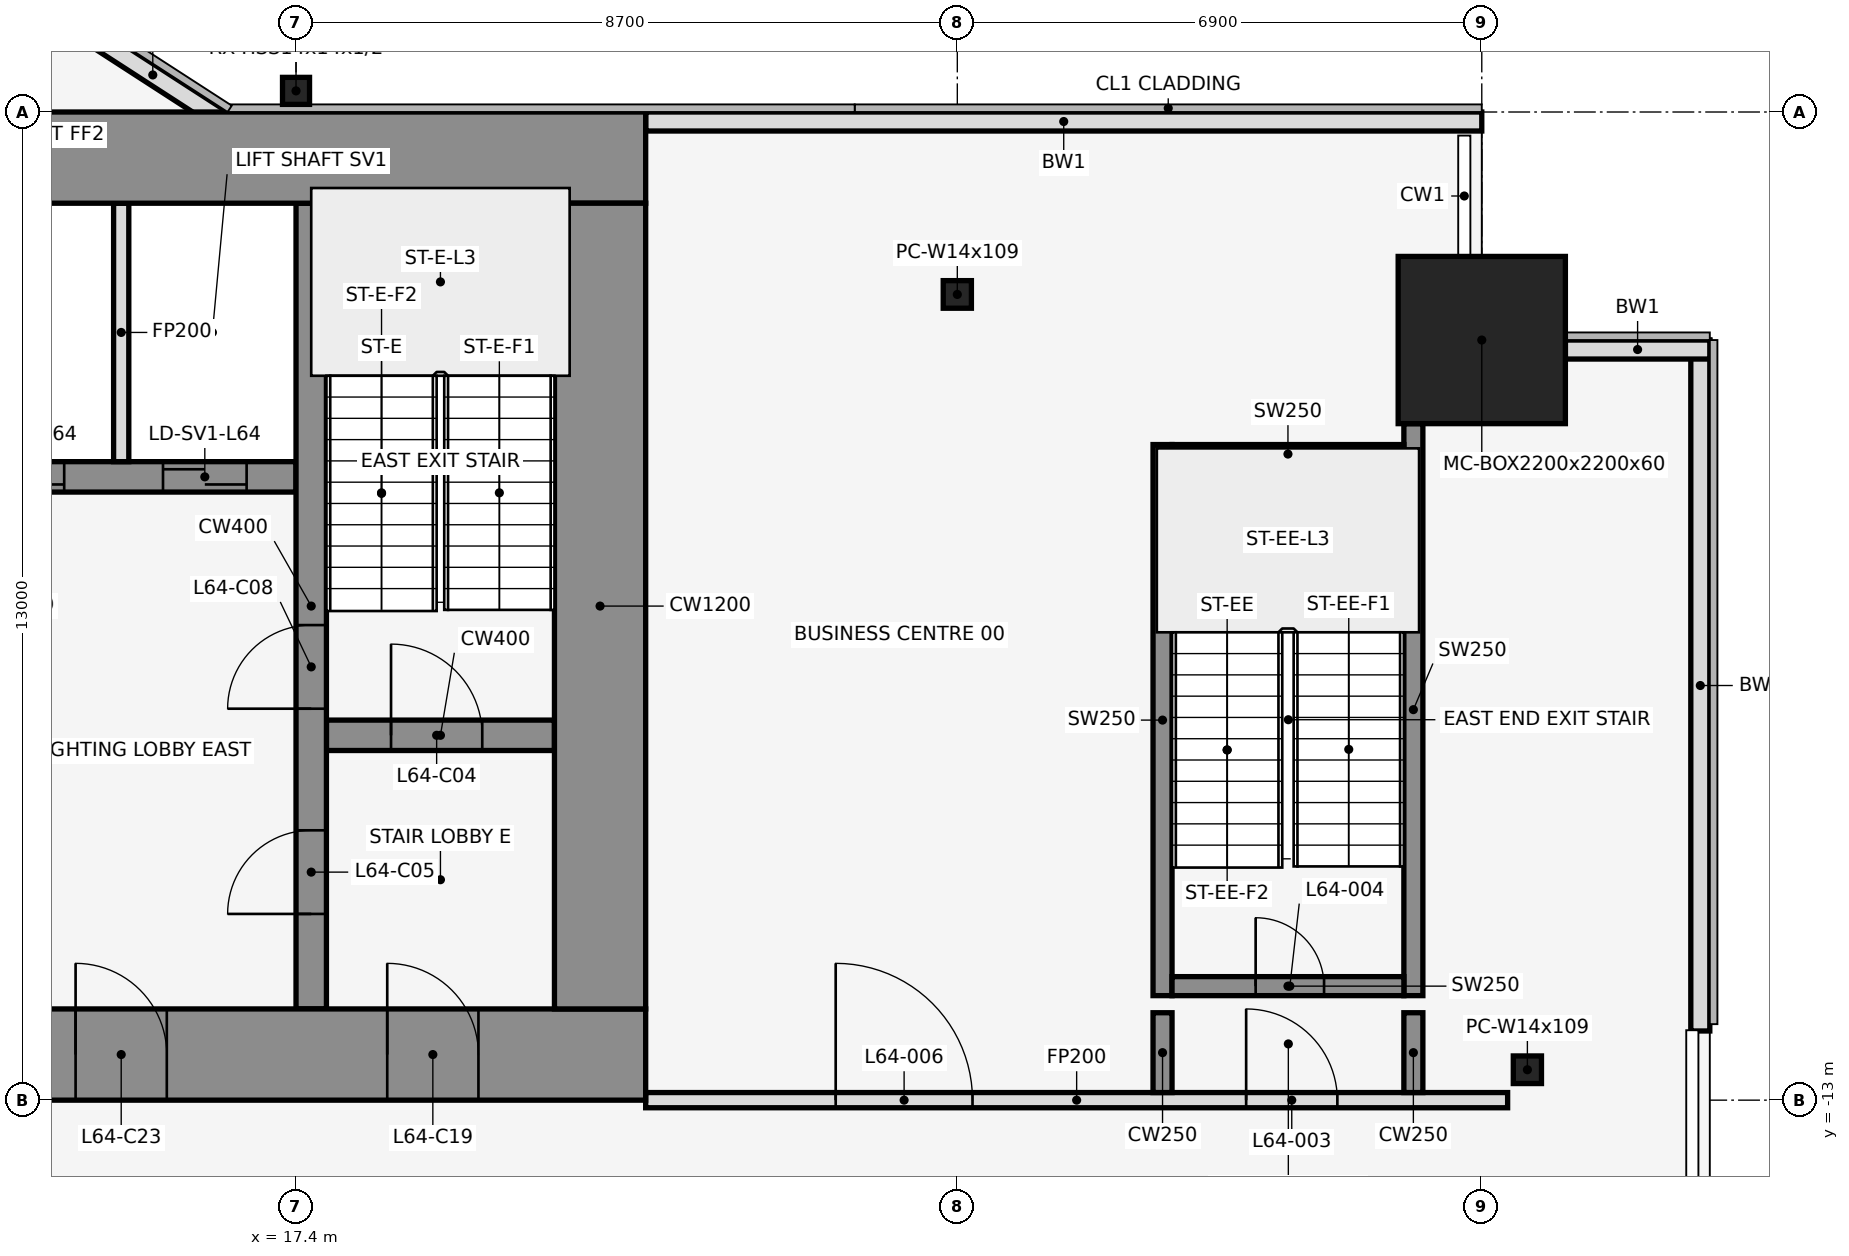
"""IFC4 building model, lengths in metres.
Left out: names, types, materials, properties, quantities, classifications, styles, units other than length and angle.
Written with IfcOpenShell. Run it as: python <this file> out.ifc"""

import sys

from ifc_helpers import new_model, si_unit, direction, frame, frame_2d, origin, origin_2d, place, context, subcontext, project, spatial, rectangle, hollow_rectangle, i_section, extrude, element, fill, save


model = new_model("IFC4")
c1 = context("Model", 3, precision=1e-05, world=origin(), true_north=direction((0.0, 1.0)))
c2 = subcontext(c1, "Body", "Model", "MODEL_VIEW")
j1 = project(units=[si_unit("LENGTHUNIT", "METRE"), si_unit("PLANEANGLEUNIT", "RADIAN")], contexts=[c1])
p1 = place(None, origin())
s1 = spatial("IfcSite", under=j1, at=p1, CompositionType="ELEMENT")
p2 = place(p1, origin())
s2 = spatial("IfcBuilding", under=s1, at=p2, CompositionType="ELEMENT")
p3 = place(p2, frame((0.0, 0.0, 283.4)))
s3 = spatial("IfcBuildingStorey", under=s2, at=p3, CompositionType="ELEMENT", Elevation=283.4)
p4 = place(p3, frame((26.1, -2.4, 0.0), z_axis=(0.0, 0.0, 1.0), x_axis=(1.0, 0.0, 0.0)))
e1 = element("IfcColumn", 1, at=p4, inside=s3, PredefinedType="COLUMN", context=c2, shape_type="SweptSolid", body=[
    extrude(i_section(OverallWidth=0.371, OverallDepth=0.363, WebThickness=0.013, FlangeThickness=0.022, at=origin_2d()), origin(), (0.0, 0.0, 1.0), 4.2),
])
p5 = place(p3, frame((33.0, -3.0, 0.0), z_axis=(0.0, 0.0, 1.0), x_axis=(1.0, 0.0, 0.0)))
e2 = element("IfcColumn", 2, at=p5, inside=s3, PredefinedType="COLUMN", context=c2, shape_type="SweptSolid", body=[
    extrude(hollow_rectangle(XDim=2.2, YDim=2.2, WallThickness=0.06, at=origin_2d()), origin(), (0.0, 0.0, 1.0), 4.2),
])
p6 = place(p3, frame((17.4, 0.278, 0.0), z_axis=(0.0, 0.0, 1.0), x_axis=(1.0, 0.0, 0.0)))
e3 = element("IfcColumn", 3, at=p6, inside=s3, PredefinedType="COLUMN", context=c2, shape_type="SweptSolid", body=[
    extrude(hollow_rectangle(XDim=0.356, YDim=0.356, WallThickness=0.012, at=origin_2d()), origin(), (0.0, 0.0, 1.0), 4.2),
])
p7 = place(p3, frame((33.6, -12.6, 0.0), z_axis=(0.0, 0.0, 1.0), x_axis=(1.0, 0.0, 0.0)))
e4 = element("IfcColumn", 4, at=p7, inside=s3, PredefinedType="COLUMN", context=c2, shape_type="SweptSolid", body=[
    extrude(i_section(OverallWidth=0.371, OverallDepth=0.363, WebThickness=0.013, FlangeThickness=0.022, at=origin_2d()), origin(), (0.0, 0.0, 1.0), 4.2),
])
p8 = place(p3, frame((33.0, -0.125, 0.0), z_axis=(0.0, 0.0, 1.0), x_axis=(-1.0, 0.0, 0.0)))
e5 = element("IfcWall", 5, at=p8, inside=s3, PredefinedType="STANDARD", context=c2, shape_type="SweptSolid", body=[
    extrude(rectangle(XDim=11.0, YDim=0.25, at=frame_2d((5.5, 0.0))), origin(), (0.0, 0.0, 1.0), 4.0),
])
p9 = place(p3, frame((16.432, -0.105, 0.0), z_axis=(0.0, 0.0, 1.0), x_axis=(-0.83981312244, 0.542875602121, 0.0)))
e6 = element("IfcWall", 6, at=p9, inside=s3, PredefinedType="STANDARD", context=c2, shape_type="SweptSolid", body=[
    extrude(rectangle(XDim=2.183, YDim=0.25, at=frame_2d((1.091, 0.0))), origin(), (0.0, 0.0, 1.0), 4.0),
])
p10 = place(p3, frame((35.875, -12.09, 0.0), z_axis=(0.0, 0.0, 1.0), x_axis=(0.0, 1.0, 0.0)))
e7 = element("IfcWall", 7, at=p10, inside=s3, PredefinedType="STANDARD", context=c2, shape_type="SweptSolid", body=[
    extrude(rectangle(XDim=9.09, YDim=0.25, at=frame_2d((4.545, 0.0))), origin(), (0.0, 0.0, 1.0), 4.0),
])
p11 = place(p3, frame((36.0, -3.125, 0.0), z_axis=(0.0, 0.0, 1.0), x_axis=(-1.0, 0.0, 0.0)))
e8 = element("IfcWall", 8, at=p11, inside=s3, PredefinedType="STANDARD", context=c2, shape_type="SweptSolid", body=[
    extrude(rectangle(XDim=1.9, YDim=0.25, at=frame_2d((0.95, 0.0))), origin(), (0.0, 0.0, 1.0), 4.0),
])
p12 = place(p3, frame((28.8, -11.625, 0.0), z_axis=(0.0, 0.0, 1.0), x_axis=(0.0, 1.0, 0.0)))
e9 = element("IfcWall", 9, at=p12, inside=s3, PredefinedType="SHEAR", context=c2, shape_type="SweptSolid", body=[
    extrude(rectangle(XDim=7.25, YDim=0.25, at=frame_2d((3.625, 0.0))), origin(), (0.0, 0.0, 1.0), 4.2),
])
p13 = place(p3, frame((32.1, -11.625, 0.0), z_axis=(0.0, 0.0, 1.0), x_axis=(0.0, 1.0, 0.0)))
e10 = element("IfcWall", 10, at=p13, inside=s3, PredefinedType="SHEAR", context=c2, shape_type="SweptSolid", body=[
    extrude(rectangle(XDim=7.525, YDim=0.25, at=frame_2d((3.762, 0.0))), origin(), (0.0, 0.0, 1.0), 4.2),
])
p14 = place(p3, frame((28.925, -11.5, 0.0), z_axis=(0.0, 0.0, 1.0), x_axis=(1.0, 0.0, 0.0)))
e11 = element("IfcWall", 11, at=p14, inside=s3, PredefinedType="SHEAR", context=c2, shape_type="SweptSolid", body=[
    extrude(rectangle(XDim=3.05, YDim=0.25, at=frame_2d((1.525, 0.0))), origin(), (0.0, 0.0, 1.0), 4.2),
])
p15 = place(p14, frame((1.1, 0.0, 0.0)))
e12 = element("IfcOpeningElement", 12, at=p15, cuts=e11, PredefinedType="OPENING", context=c2, shape_type="SweptSolid", body=[
    extrude(rectangle(XDim=0.9, YDim=2.1, at=frame_2d((0.45, 1.05))), frame((0.0, 0.137, 0.0), z_axis=(0.0, -1.0, 0.0), x_axis=(1.0, 0.0, 0.0)), (0.0, 0.0, 1.0), 0.274),
])
p16 = place(p3, frame((28.925, -4.5, 0.0), z_axis=(0.0, 0.0, 1.0), x_axis=(1.0, 0.0, 0.0)))
e13 = element("IfcWall", 13, at=p16, inside=s3, PredefinedType="SHEAR", context=c2, shape_type="SweptSolid", body=[
    extrude(rectangle(XDim=3.05, YDim=0.25, at=frame_2d((1.525, 0.0))), origin(), (0.0, 0.0, 1.0), 4.2),
])
p17 = place(p3, frame((22.0, -13.0, 0.0), z_axis=(0.0, 0.0, 1.0), x_axis=(1.0, 0.0, 0.0)))
e14 = element("IfcWall", 14, at=p17, inside=s3, PredefinedType="PARTITIONING", context=c2, shape_type="SweptSolid", body=[
    extrude(rectangle(XDim=11.34, YDim=0.2, at=frame_2d((5.67, 0.0))), origin(), (0.0, 0.0, 1.0), 3.068),
])
p18 = place(p17, frame((7.9, 0.0, 0.0)))
e15 = element("IfcOpeningElement", 15, at=p18, cuts=e14, PredefinedType="OPENING", context=c2, shape_type="SweptSolid", body=[
    extrude(rectangle(XDim=1.2, YDim=2.1, at=frame_2d((0.6, 1.05))), frame((0.0, 0.112, 0.0), z_axis=(0.0, -1.0, 0.0), x_axis=(1.0, 0.0, 0.0)), (0.0, 0.0, 1.0), 0.224),
])
p19 = place(p17, frame((2.5, 0.0, 0.0)))
e16 = element("IfcOpeningElement", 16, at=p19, cuts=e14, PredefinedType="OPENING", context=c2, shape_type="SweptSolid", body=[
    extrude(rectangle(XDim=1.8, YDim=2.1, at=frame_2d((0.9, 1.05))), frame((0.0, 0.112, 0.0), z_axis=(0.0, -1.0, 0.0), x_axis=(1.0, 0.0, 0.0)), (0.0, 0.0, 1.0), 0.224),
])
for number, where, z_axis, x_axis in (
    (17, (28.8, -12.9, 0.0), (0.0, 0.0, 1.0), (0.0, 1.0, 0.0)),
    (18, (32.1, -12.9, 0.0), (0.0, 0.0, 1.0), (0.0, 1.0, 0.0)),
):
    element("IfcWall", number, at=place(p3, frame(where, z_axis=z_axis, x_axis=x_axis)), inside=s3, PredefinedType="SHEAR", context=c2, shape_type="SweptSolid", body=[
        extrude(rectangle(XDim=1.05, YDim=0.25, at=frame_2d((0.525, 0.0))), origin(), (0.0, 0.0, 1.0), 4.2),
    ])
p20 = place(p3, frame((17.8, -8.2, 0.0), z_axis=(0.0, 0.0, 1.0), x_axis=(1.0, 0.0, 0.0)))
e19 = element("IfcWall", 19, at=p20, inside=s3, PredefinedType="SHEAR", context=c2, shape_type="SweptSolid", body=[
    extrude(rectangle(XDim=3.0, YDim=0.4, at=frame_2d((1.5, 0.0))), origin(), (0.0, 0.0, 1.0), 4.2),
])
p21 = place(p20, frame((0.85, 0.0, 0.0)))
e20 = element("IfcOpeningElement", 20, at=p21, cuts=e19, PredefinedType="OPENING", context=c2, shape_type="SweptSolid", body=[
    extrude(rectangle(XDim=1.2, YDim=2.1, at=frame_2d((0.6, 1.05))), frame((0.0, 0.212, 0.0), z_axis=(0.0, -1.0, 0.0), x_axis=(1.0, 0.0, 0.0)), (0.0, 0.0, 1.0), 0.424),
])
p22 = place(p3, frame((3.8, -4.8, 0.0), z_axis=(0.0, 0.0, 1.0), x_axis=(1.0, 0.0, 0.0)))
e21 = element("IfcWall", 21, at=p22, inside=s3, PredefinedType="SHEAR", context=c2, shape_type="SweptSolid", body=[
    extrude(rectangle(XDim=13.6, YDim=0.4, at=frame_2d((6.8, 0.0))), origin(), (0.0, 0.0, 1.0), 4.2),
])
p23 = place(p22, frame((0.75, 0.0, 0.0)))
e22 = element("IfcOpeningElement", 22, at=p23, cuts=e21, PredefinedType="OPENING", context=c2, shape_type="SweptSolid", body=[
    extrude(rectangle(XDim=1.2, YDim=2.1, at=frame_2d((0.6, 1.05))), frame((0.0, 0.212, 0.0), z_axis=(0.0, -1.0, 0.0), x_axis=(1.0, 0.0, 0.0)), (0.0, 0.0, 1.0), 0.424),
])
p24 = place(p22, frame((3.65, 0.0, 0.0)))
e23 = element("IfcOpeningElement", 23, at=p24, cuts=e21, PredefinedType="OPENING", context=c2, shape_type="SweptSolid", body=[
    extrude(rectangle(XDim=1.2, YDim=2.1, at=frame_2d((0.6, 1.05))), frame((0.0, 0.212, 0.0), z_axis=(0.0, -1.0, 0.0), x_axis=(1.0, 0.0, 0.0)), (0.0, 0.0, 1.0), 0.424),
])
p25 = place(p22, frame((6.65, 0.0, 0.0)))
e24 = element("IfcOpeningElement", 24, at=p25, cuts=e21, PredefinedType="OPENING", context=c2, shape_type="SweptSolid", body=[
    extrude(rectangle(XDim=1.2, YDim=2.1, at=frame_2d((0.6, 1.05))), frame((0.0, 0.212, 0.0), z_axis=(0.0, -1.0, 0.0), x_axis=(1.0, 0.0, 0.0)), (0.0, 0.0, 1.0), 0.424),
])
p26 = place(p22, frame((9.45, 0.0, 0.0)))
e25 = element("IfcOpeningElement", 25, at=p26, cuts=e21, PredefinedType="OPENING", context=c2, shape_type="SweptSolid", body=[
    extrude(rectangle(XDim=1.1, YDim=2.1, at=frame_2d((0.55, 1.05))), frame((0.0, 0.212, 0.0), z_axis=(0.0, -1.0, 0.0), x_axis=(1.0, 0.0, 0.0)), (0.0, 0.0, 1.0), 0.424),
])
p27 = place(p22, frame((11.85, 0.0, 0.0)))
e26 = element("IfcOpeningElement", 26, at=p27, cuts=e21, PredefinedType="OPENING", context=c2, shape_type="SweptSolid", body=[
    extrude(rectangle(XDim=1.1, YDim=2.1, at=frame_2d((0.55, 1.05))), frame((0.0, 0.212, 0.0), z_axis=(0.0, -1.0, 0.0), x_axis=(1.0, 0.0, 0.0)), (0.0, 0.0, 1.0), 0.424),
])
p28 = place(p3, frame((15.1, -4.6, 0.0), z_axis=(0.0, 0.0, 1.0), x_axis=(0.0, 1.0, 0.0)))
e27 = element("IfcWall", 27, at=p28, inside=s3, PredefinedType="PARTITIONING", context=c2, shape_type="SweptSolid", body=[
    extrude(rectangle(XDim=3.4, YDim=0.2, at=frame_2d((1.7, 0.0))), origin(), (0.0, 0.0, 1.0), 3.068),
])
p29 = place(p3, frame((17.6, -11.8, 0.0), z_axis=(0.0, 0.0, 1.0), x_axis=(0.0, 1.0, 0.0)))
e28 = element("IfcWall", 28, at=p29, inside=s3, PredefinedType="SHEAR", context=c2, shape_type="SweptSolid", body=[
    extrude(rectangle(XDim=10.6, YDim=0.4, at=frame_2d((5.3, 0.0))), origin(), (0.0, 0.0, 1.0), 4.2),
])
p30 = place(p29, frame((1.25, 0.0, 0.0)))
e29 = element("IfcOpeningElement", 29, at=p30, cuts=e28, PredefinedType="OPENING", context=c2, shape_type="SweptSolid", body=[
    extrude(rectangle(XDim=1.1, YDim=2.1, at=frame_2d((0.55, 1.05))), frame((0.0, 0.212, 0.0), z_axis=(0.0, -1.0, 0.0), x_axis=(1.0, 0.0, 0.0)), (0.0, 0.0, 1.0), 0.424),
])
p31 = place(p29, frame((3.95, 0.0, 0.0)))
e30 = element("IfcOpeningElement", 30, at=p31, cuts=e28, PredefinedType="OPENING", context=c2, shape_type="SweptSolid", body=[
    extrude(rectangle(XDim=1.1, YDim=2.1, at=frame_2d((0.55, 1.05))), frame((0.0, 0.212, 0.0), z_axis=(0.0, -1.0, 0.0), x_axis=(1.0, 0.0, 0.0)), (0.0, 0.0, 1.0), 0.424),
])
p32 = place(p3, frame((-22.0, -0.6, 0.0), z_axis=(0.0, 0.0, 1.0), x_axis=(1.0, 0.0, 0.0)))
e31 = element("IfcWall", 31, at=p32, inside=s3, PredefinedType="SHEAR", context=c2, shape_type="SweptSolid", body=[
    extrude(rectangle(XDim=44.0, YDim=1.2, at=frame_2d((22.0, 0.0))), origin(), (0.0, 0.0, 1.0), 4.2),
])
p33 = place(p32, frame((18.55, 0.0, 0.0)))
e32 = element("IfcOpeningElement", 32, at=p33, cuts=e31, PredefinedType="OPENING", context=c2, shape_type="SweptSolid", body=[
    extrude(rectangle(XDim=0.9, YDim=2.1, at=frame_2d((0.45, 1.05))), frame((0.0, 0.612, 0.0), z_axis=(0.0, -1.0, 0.0), x_axis=(1.0, 0.0, 0.0)), (0.0, 0.0, 1.0), 1.224),
])
p34 = place(p32, frame((24.55, 0.0, 0.0)))
e33 = element("IfcOpeningElement", 33, at=p34, cuts=e31, PredefinedType="OPENING", context=c2, shape_type="SweptSolid", body=[
    extrude(rectangle(XDim=0.9, YDim=2.1, at=frame_2d((0.45, 1.05))), frame((0.0, 0.612, 0.0), z_axis=(0.0, -1.0, 0.0), x_axis=(1.0, 0.0, 0.0)), (0.0, 0.0, 1.0), 1.224),
])
p35 = place(p3, frame((-22.0, -12.4, 0.0), z_axis=(0.0, 0.0, 1.0), x_axis=(1.0, 0.0, 0.0)))
e34 = element("IfcWall", 34, at=p35, inside=s3, PredefinedType="SHEAR", context=c2, shape_type="SweptSolid", body=[
    extrude(rectangle(XDim=44.0, YDim=1.2, at=frame_2d((22.0, 0.0))), origin(), (0.0, 0.0, 1.0), 4.2),
])
p36 = place(p35, frame((2.2, 0.0, 0.0)))
e35 = element("IfcOpeningElement", 35, at=p36, cuts=e34, PredefinedType="OPENING", context=c2, shape_type="SweptSolid", body=[
    extrude(rectangle(XDim=1.2, YDim=2.1, at=frame_2d((0.6, 1.05))), frame((0.0, 0.612, 0.0), z_axis=(0.0, -1.0, 0.0), x_axis=(1.0, 0.0, 0.0)), (0.0, 0.0, 1.0), 1.224),
])
p37 = place(p35, frame((21.4, 0.0, 0.0)))
e36 = element("IfcOpeningElement", 36, at=p37, cuts=e34, PredefinedType="OPENING", context=c2, shape_type="SweptSolid", body=[
    extrude(rectangle(XDim=1.2, YDim=2.1, at=frame_2d((0.6, 1.05))), frame((0.0, 0.612, 0.0), z_axis=(0.0, -1.0, 0.0), x_axis=(1.0, 0.0, 0.0)), (0.0, 0.0, 1.0), 1.224),
])
p38 = place(p35, frame((40.6, 0.0, 0.0)))
e37 = element("IfcOpeningElement", 37, at=p38, cuts=e34, PredefinedType="OPENING", context=c2, shape_type="SweptSolid", body=[
    extrude(rectangle(XDim=1.2, YDim=2.1, at=frame_2d((0.6, 1.05))), frame((0.0, 0.612, 0.0), z_axis=(0.0, -1.0, 0.0), x_axis=(1.0, 0.0, 0.0)), (0.0, 0.0, 1.0), 1.224),
])
p39 = place(p35, frame((16.0, 0.0, 0.0)))
e38 = element("IfcOpeningElement", 38, at=p39, cuts=e34, PredefinedType="OPENING", context=c2, shape_type="SweptSolid", body=[
    extrude(rectangle(XDim=1.8, YDim=2.1, at=frame_2d((0.9, 1.05))), frame((0.0, 0.612, 0.0), z_axis=(0.0, -1.0, 0.0), x_axis=(1.0, 0.0, 0.0)), (0.0, 0.0, 1.0), 1.224),
])
p40 = place(p35, frame((6.3, 0.0, 0.0)))
e39 = element("IfcOpeningElement", 39, at=p40, cuts=e34, PredefinedType="OPENING", context=c2, shape_type="SweptSolid", body=[
    extrude(rectangle(XDim=1.2, YDim=2.1, at=frame_2d((0.6, 1.05))), frame((0.0, 0.612, 0.0), z_axis=(0.0, -1.0, 0.0), x_axis=(1.0, 0.0, 0.0)), (0.0, 0.0, 1.0), 1.224),
])
p41 = place(p35, frame((26.2, 0.0, 0.0)))
e40 = element("IfcOpeningElement", 40, at=p41, cuts=e34, PredefinedType="OPENING", context=c2, shape_type="SweptSolid", body=[
    extrude(rectangle(XDim=1.8, YDim=2.1, at=frame_2d((0.9, 1.05))), frame((0.0, 0.612, 0.0), z_axis=(0.0, -1.0, 0.0), x_axis=(1.0, 0.0, 0.0)), (0.0, 0.0, 1.0), 1.224),
])
p42 = place(p35, frame((36.5, 0.0, 0.0)))
e41 = element("IfcOpeningElement", 41, at=p42, cuts=e34, PredefinedType="OPENING", context=c2, shape_type="SweptSolid", body=[
    extrude(rectangle(XDim=1.2, YDim=2.1, at=frame_2d((0.6, 1.05))), frame((0.0, 0.612, 0.0), z_axis=(0.0, -1.0, 0.0), x_axis=(1.0, 0.0, 0.0)), (0.0, 0.0, 1.0), 1.224),
])
p43 = place(p3, frame((21.4, -11.8, 0.0), z_axis=(0.0, 0.0, 1.0), x_axis=(0.0, 1.0, 0.0)))
e42 = element("IfcWall", 42, at=p43, inside=s3, PredefinedType="SHEAR", context=c2, shape_type="SweptSolid", body=[
    extrude(rectangle(XDim=10.6, YDim=1.2, at=frame_2d((5.3, 0.0))), origin(), (0.0, 0.0, 1.0), 4.2),
])
p44 = place(p18, origin())
e43 = element("IfcDoor", 43, at=p44, inside=s3, OperationType="SINGLE_SWING_RIGHT", PredefinedType="DOOR", context=c2, shape_type="SweptSolid", body=[
    extrude(rectangle(XDim=1.2, YDim=2.1, at=frame_2d((0.6, 1.05))), frame((0.0, 0.025, 0.0), z_axis=(0.0, -1.0, 0.0), x_axis=(1.0, 0.0, 0.0)), (0.0, 0.0, 1.0), 0.05),
])
fill(e15, e43)
p45 = place(p15, origin())
e44 = element("IfcDoor", 44, at=p45, inside=s3, OperationType="SINGLE_SWING_LEFT", PredefinedType="DOOR", context=c2, shape_type="SweptSolid", body=[
    extrude(rectangle(XDim=0.9, YDim=2.1, at=frame_2d((0.45, 1.05))), frame((0.0, 0.025, 0.0), z_axis=(0.0, -1.0, 0.0), x_axis=(1.0, 0.0, 0.0)), (0.0, 0.0, 1.0), 0.05),
])
fill(e12, e44)
p46 = place(p19, origin())
e45 = element("IfcDoor", 45, at=p46, inside=s3, OperationType="SINGLE_SWING_LEFT", PredefinedType="DOOR", context=c2, shape_type="SweptSolid", body=[
    extrude(rectangle(XDim=1.8, YDim=2.1, at=frame_2d((0.9, 1.05))), frame((0.0, 0.025, 0.0), z_axis=(0.0, -1.0, 0.0), x_axis=(1.0, 0.0, 0.0)), (0.0, 0.0, 1.0), 0.05),
])
fill(e16, e45)
p47 = place(p21, origin())
e46 = element("IfcDoor", 46, at=p47, inside=s3, OperationType="SINGLE_SWING_RIGHT", PredefinedType="DOOR", context=c2, shape_type="SweptSolid", body=[
    extrude(rectangle(XDim=1.2, YDim=2.1, at=frame_2d((0.6, 1.05))), frame((0.0, 0.025, 0.0), z_axis=(0.0, -1.0, 0.0), x_axis=(1.0, 0.0, 0.0)), (0.0, 0.0, 1.0), 0.05),
])
fill(e20, e46)
p48 = place(p30, origin())
e47 = element("IfcDoor", 47, at=p48, inside=s3, OperationType="SINGLE_SWING_LEFT", PredefinedType="DOOR", context=c2, shape_type="SweptSolid", body=[
    extrude(rectangle(XDim=1.1, YDim=2.1, at=frame_2d((0.55, 1.05))), frame((0.0, 0.025, 0.0), z_axis=(0.0, -1.0, 0.0), x_axis=(1.0, 0.0, 0.0)), (0.0, 0.0, 1.0), 0.05),
])
fill(e29, e47)
p49 = place(p26, origin())
e48 = element("IfcDoor", 48, at=p49, inside=s3, OperationType="DOUBLE_DOOR_SLIDING", PredefinedType="DOOR", context=c2, shape_type="SweptSolid", body=[
    extrude(rectangle(XDim=1.1, YDim=2.1, at=frame_2d((0.55, 1.05))), frame((0.0, 0.025, 0.0), z_axis=(0.0, -1.0, 0.0), x_axis=(1.0, 0.0, 0.0)), (0.0, 0.0, 1.0), 0.05),
])
fill(e25, e48)
p50 = place(p27, origin())
e49 = element("IfcDoor", 49, at=p50, inside=s3, OperationType="DOUBLE_DOOR_SLIDING", PredefinedType="DOOR", context=c2, shape_type="SweptSolid", body=[
    extrude(rectangle(XDim=1.1, YDim=2.1, at=frame_2d((0.55, 1.05))), frame((0.0, 0.025, 0.0), z_axis=(0.0, -1.0, 0.0), x_axis=(1.0, 0.0, 0.0)), (0.0, 0.0, 1.0), 0.05),
])
fill(e26, e49)
p51 = place(p31, origin())
e50 = element("IfcDoor", 50, at=p51, inside=s3, OperationType="SINGLE_SWING_RIGHT", PredefinedType="DOOR", context=c2, shape_type="SweptSolid", body=[
    extrude(rectangle(XDim=1.1, YDim=2.1, at=frame_2d((0.55, 1.05))), frame((0.0, 0.025, 0.0), z_axis=(0.0, -1.0, 0.0), x_axis=(1.0, 0.0, 0.0)), (0.0, 0.0, 1.0), 0.05),
])
fill(e30, e50)
p52 = place(p38, frame((1.2, 0.0, 0.0), z_axis=(0.0, 0.0, 1.0), x_axis=(-1.0, 0.0, 0.0)))
e51 = element("IfcDoor", 51, at=p52, inside=s3, OperationType="SINGLE_SWING_RIGHT", PredefinedType="DOOR", context=c2, shape_type="SweptSolid", body=[
    extrude(rectangle(XDim=1.2, YDim=2.1, at=frame_2d((0.6, 1.05))), frame((0.0, 0.025, 0.0), z_axis=(0.0, -1.0, 0.0), x_axis=(1.0, 0.0, 0.0)), (0.0, 0.0, 1.0), 0.05),
])
fill(e37, e51)
p53 = place(p42, frame((1.2, 0.0, 0.0), z_axis=(0.0, 0.0, 1.0), x_axis=(-1.0, 0.0, 0.0)))
e52 = element("IfcDoor", 52, at=p53, inside=s3, OperationType="SINGLE_SWING_RIGHT", PredefinedType="DOOR", context=c2, shape_type="SweptSolid", body=[
    extrude(rectangle(XDim=1.2, YDim=2.1, at=frame_2d((0.6, 1.05))), frame((0.0, 0.025, 0.0), z_axis=(0.0, -1.0, 0.0), x_axis=(1.0, 0.0, 0.0)), (0.0, 0.0, 1.0), 0.05),
])
fill(e41, e52)
save(model, sys.argv[1])
